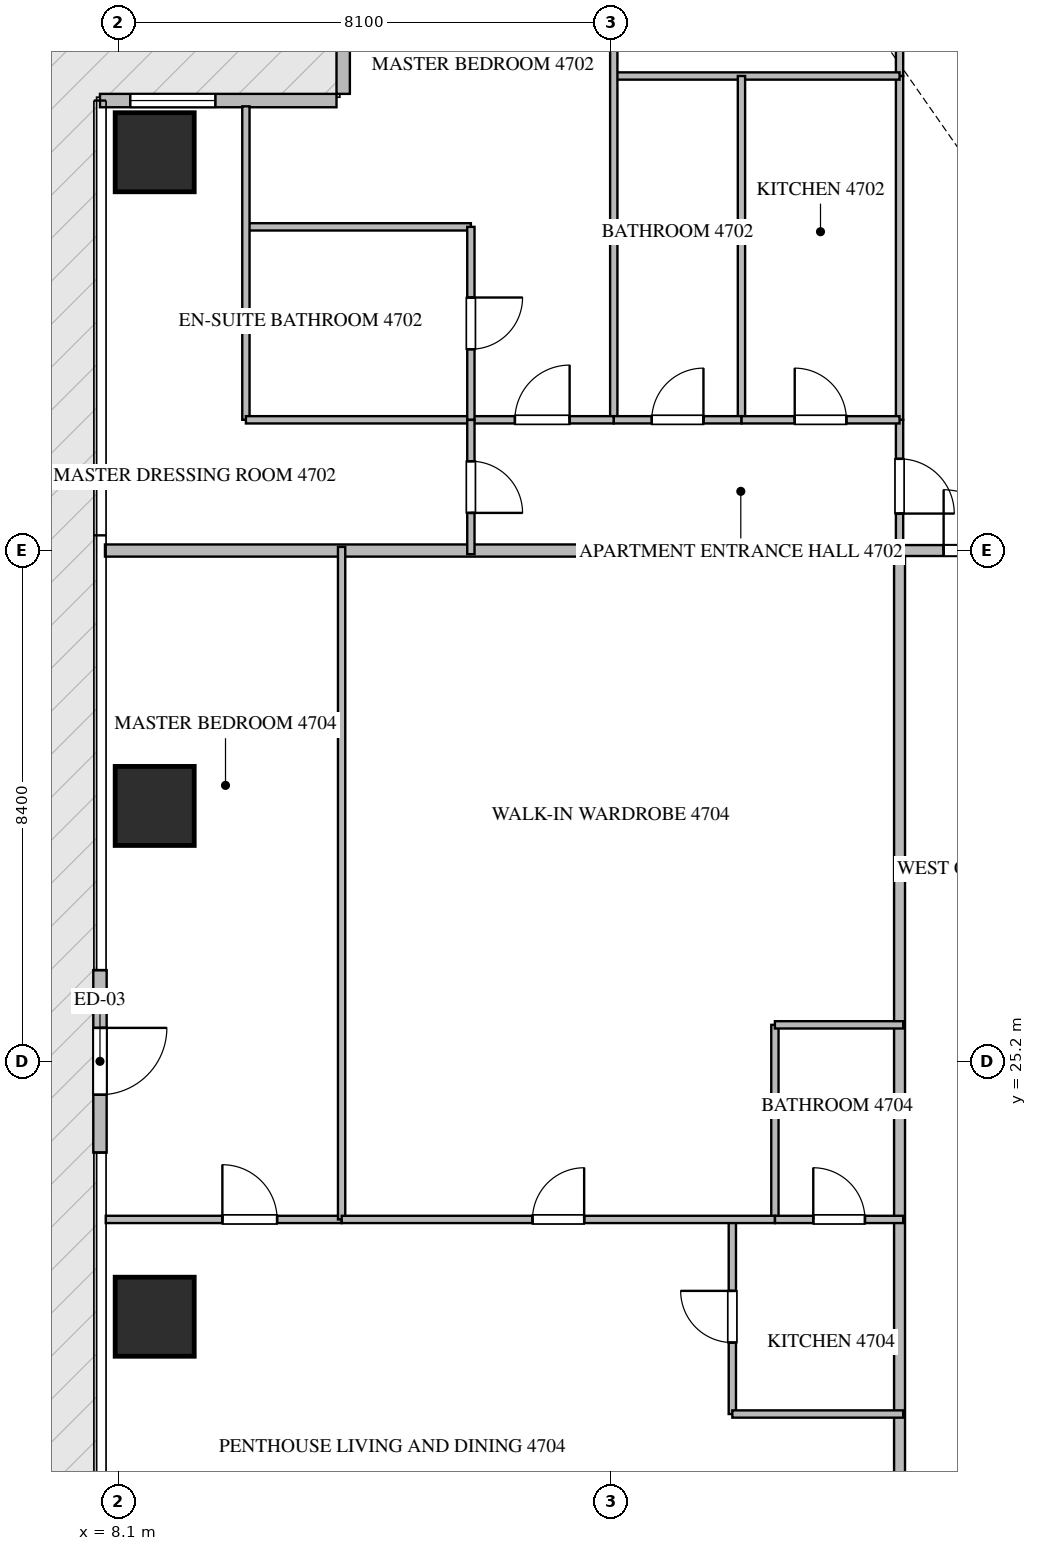
"""IFC4 building model, lengths in metres.
Left out: names, types, materials, properties, quantities, classifications, styles, units other than length and angle.
Written with IfcOpenShell. Run it as: python <this file> out.ifc"""

import sys

from ifc_helpers import new_model, si_unit, direction, frame, frame_2d, origin, origin_2d, place, context, subcontext, project, spatial, rectangle, extrude, source, transform, mapped, element, fill, save


model = new_model("IFC4")
c1 = context("Model", 3, precision=1e-05, world=origin(), true_north=direction((0.0, 1.0)))
c2 = subcontext(c1, "Body", "Model", "MODEL_VIEW")
j1 = project(units=[si_unit("LENGTHUNIT", "METRE"), si_unit("PLANEANGLEUNIT", "RADIAN")], contexts=[c1])
p1 = place(None, origin())
s1 = spatial("IfcSite", under=j1, at=p1, CompositionType="ELEMENT")
p2 = place(p1, origin())
s2 = spatial("IfcBuilding", under=s1, at=p2, CompositionType="ELEMENT")
p3 = place(p2, frame((0.0, 0.0, 187.65)))
s3 = spatial("IfcBuildingStorey", under=s2, at=p3, CompositionType="ELEMENT", Elevation=187.65)
m1 = source(origin(), c2, "Body", "SweptSolid", [
    extrude(rectangle(XDim=1.3, YDim=1.3, at=origin_2d()), origin(), (0.0, 0.0, 1.0), 3.75),
])
for number, where, z_axis, x_axis in (
    (1, (8.7, 21.0, -0.26), (0.0, 0.0, 1.0), (1.0, 0.0, 0.0)),
    (2, (8.7, 29.4, -0.26), (0.0, 0.0, 1.0), (1.0, 0.0, 0.0)),
    (3, (8.7, 40.15, -0.26), (0.0, 0.0, 1.0), (1.0, 0.0, 0.0)),
):
    element("IfcColumn", number, at=place(p3, frame(where, z_axis=z_axis, x_axis=x_axis)), inside=s3, PredefinedType="COLUMN", context=c2, shape_type="MappedRepresentation", body=[
        mapped(m1, transform((0.0, 0.0, 0.0), scale=1.0)),
    ])
p4 = place(p3, frame((11.8, 44.89, 0.0), z_axis=(0.0, 0.0, 1.0), x_axis=(0.0, -1.0, 0.0)))
e4 = element("IfcWall", 4, at=p4, inside=s3, PredefinedType="ELEMENTEDWALL", context=c2, shape_type="SweptSolid", body=[
    extrude(rectangle(XDim=3.78, YDim=0.22, at=frame_2d((1.89, 0.0))), origin(), (0.0, 0.0, 1.0), 3.475),
])
p5 = place(p4, frame((1.19, 0.0, 0.65)))
e5 = element("IfcOpeningElement", 5, at=p5, cuts=e4, PredefinedType="OPENING", context=c2, shape_type="SweptSolid", body=[
    extrude(rectangle(XDim=1.4, YDim=2.05, at=frame_2d((0.7, 1.025))), frame((0.0, 0.12, 0.0), z_axis=(0.0, -1.0, 0.0), x_axis=(1.0, 0.0, 0.0)), (0.0, 0.0, 1.0), 0.24),
])
p6 = place(p3, frame((11.69, 41.0, 0.0), z_axis=(0.0, 0.0, 1.0), x_axis=(-1.0, 0.0, 0.0)))
e6 = element("IfcWall", 6, at=p6, inside=s3, PredefinedType="ELEMENTEDWALL", context=c2, shape_type="SweptSolid", body=[
    extrude(rectangle(XDim=3.89, YDim=0.22, at=frame_2d((1.945, 0.0))), origin(), (0.0, 0.0, 1.0), 3.475),
])
p7 = place(p6, frame((1.992, 0.0, 0.65)))
e7 = element("IfcOpeningElement", 7, at=p7, cuts=e6, PredefinedType="OPENING", context=c2, shape_type="SweptSolid", body=[
    extrude(rectangle(XDim=1.4, YDim=2.05, at=frame_2d((0.7, 1.025))), frame((0.0, 0.12, 0.0), z_axis=(0.0, -1.0, 0.0), x_axis=(1.0, 0.0, 0.0)), (0.0, 0.0, 1.0), 0.24),
])
p8 = place(p3, frame((7.8, 26.7, 0.0), z_axis=(0.0, 0.0, 1.0), x_axis=(0.0, -1.0, 0.0)))
e8 = element("IfcWall", 8, at=p8, inside=s3, PredefinedType="ELEMENTEDWALL", context=c2, shape_type="SweptSolid", body=[
    extrude(rectangle(XDim=3.0, YDim=0.22, at=frame_2d((1.5, 0.0))), origin(), (0.0, 0.0, 1.0), 3.475),
])
p9 = place(p8, frame((0.95, 0.0, 0.0)))
e9 = element("IfcOpeningElement", 9, at=p9, cuts=e8, PredefinedType="OPENING", context=c2, shape_type="SweptSolid", body=[
    extrude(rectangle(XDim=1.1, YDim=2.2, at=frame_2d((0.55, 1.1))), frame((0.0, 0.12, 0.0), z_axis=(0.0, -1.0, 0.0), x_axis=(1.0, 0.0, 0.0)), (0.0, 0.0, 1.0), 0.24),
])
p10 = place(p3, frame((7.882, 33.6, 0.0), z_axis=(0.0, 0.0, 1.0), x_axis=(1.0, 0.0, 0.0)))
e10 = element("IfcWall", 10, at=p10, inside=s3, PredefinedType="PARTITIONING", context=c2, shape_type="SweptSolid", body=[
    extrude(rectangle(XDim=13.068, YDim=0.2, at=frame_2d((6.534, 0.0))), origin(), (0.0, 0.0, 1.0), 3.49),
])
p11 = place(p3, frame((20.95, 14.9, 0.0), z_axis=(0.0, 0.0, 1.0), x_axis=(0.0, 1.0, 0.0)))
e11 = element("IfcWall", 11, at=p11, inside=s3, PredefinedType="PARTITIONING", context=c2, shape_type="SweptSolid", body=[
    extrude(rectangle(XDim=18.7, YDim=0.18, at=frame_2d((9.35, 0.0))), origin(), (0.0, 0.0, 1.0), 3.49),
])
p12 = place(p11, frame((1.805, 0.0, 0.0)))
e12 = element("IfcOpeningElement", 12, at=p12, cuts=e11, PredefinedType="OPENING", context=c2, shape_type="SweptSolid", body=[
    extrude(rectangle(XDim=1.0, YDim=2.15, at=frame_2d((0.5, 1.075))), frame((0.0, 0.1, 0.0), z_axis=(0.0, -1.0, 0.0), x_axis=(1.0, 0.0, 0.0)), (0.0, 0.0, 1.0), 0.2),
])
p13 = place(p3, frame((20.952, 33.6, 0.0), z_axis=(0.0, 0.0, 1.0), x_axis=(1.0, 0.0, 0.0)))
e13 = element("IfcWall", 13, at=p13, inside=s3, PredefinedType="PARTITIONING", context=c2, shape_type="SweptSolid", body=[
    extrude(rectangle(XDim=2.446, YDim=0.18, at=frame_2d((1.223, 0.0))), origin(), (0.0, 0.0, 1.0), 3.49),
])
p14 = place(p13, frame((0.723, 0.0, 0.0)))
e14 = element("IfcOpeningElement", 14, at=p14, cuts=e13, PredefinedType="OPENING", context=c2, shape_type="SweptSolid", body=[
    extrude(rectangle(XDim=1.0, YDim=2.15, at=frame_2d((0.5, 1.075))), frame((0.0, 0.1, 0.0), z_axis=(0.0, -1.0, 0.0), x_axis=(1.0, 0.0, 0.0)), (0.0, 0.0, 1.0), 0.2),
])
p15 = place(p3, frame((20.95, 35.75, 0.0), z_axis=(0.0, 0.0, 1.0), x_axis=(0.0, -1.0, 0.0)))
e15 = element("IfcWall", 15, at=p15, inside=s3, PredefinedType="PARTITIONING", context=c2, shape_type="SweptSolid", body=[
    extrude(rectangle(XDim=2.148, YDim=0.12, at=frame_2d((1.074, 0.0))), origin(), (0.0, 0.0, 1.0), 3.49),
])
p16 = place(p15, frame((0.642, 0.0, 0.0)))
e16 = element("IfcOpeningElement", 16, at=p16, cuts=e15, PredefinedType="OPENING", context=c2, shape_type="SweptSolid", body=[
    extrude(rectangle(XDim=0.9, YDim=2.1, at=frame_2d((0.45, 1.05))), frame((0.0, 0.07, 0.0), z_axis=(0.0, -1.0, 0.0), x_axis=(1.0, 0.0, 0.0)), (0.0, 0.0, 1.0), 0.14),
])
p17 = place(p3, frame((20.95, 48.905, 0.0), z_axis=(0.0, 0.0, 1.0), x_axis=(0.0, -1.0, 0.0)))
e17 = element("IfcWall", 17, at=p17, inside=s3, PredefinedType="PARTITIONING", context=c2, shape_type="SweptSolid", body=[
    extrude(rectangle(XDim=7.501, YDim=0.12, at=frame_2d((3.75, 0.0))), origin(), (0.0, 0.0, 1.0), 3.49),
])
p18 = place(p17, frame((3.631, 0.0, 0.0)))
e18 = element("IfcOpeningElement", 18, at=p18, cuts=e17, PredefinedType="OPENING", context=c2, shape_type="SweptSolid", body=[
    extrude(rectangle(XDim=0.9, YDim=2.1, at=frame_2d((0.45, 1.05))), frame((0.0, 0.07, 0.0), z_axis=(0.0, -1.0, 0.0), x_axis=(1.0, 0.0, 0.0)), (0.0, 0.0, 1.0), 0.14),
])
p19 = place(p3, frame((20.95, 41.402, 0.0), z_axis=(0.0, 0.0, 1.0), x_axis=(0.0, -1.0, 0.0)))
e19 = element("IfcWall", 19, at=p19, inside=s3, PredefinedType="PARTITIONING", context=c2, shape_type="SweptSolid", body=[
    extrude(rectangle(XDim=5.65, YDim=0.12, at=frame_2d((2.825, 0.0))), origin(), (0.0, 0.0, 1.0), 3.49),
])
p20 = place(p3, frame((16.25, 41.404, 0.0), z_axis=(0.0, 0.0, 1.0), x_axis=(1.0, 0.0, 0.0)))
e20 = element("IfcWall", 20, at=p20, inside=s3, PredefinedType="PARTITIONING", context=c2, shape_type="SweptSolid", body=[
    extrude(rectangle(XDim=4.7, YDim=0.12, at=frame_2d((2.35, 0.0))), origin(), (0.0, 0.0, 1.0), 3.49),
])
p21 = place(p3, frame((16.25, 48.905, 0.0), z_axis=(0.0, 0.0, 1.0), x_axis=(0.0, -1.0, 0.0)))
e21 = element("IfcWall", 21, at=p21, inside=s3, PredefinedType="PARTITIONING", context=c2, shape_type="SweptSolid", body=[
    extrude(rectangle(XDim=13.155, YDim=0.12, at=frame_2d((6.578, 0.0))), origin(), (0.0, 0.0, 1.0), 3.49),
])
p22 = place(p3, frame((18.35, 41.404, 0.0), z_axis=(0.0, 0.0, 1.0), x_axis=(0.0, -1.0, 0.0)))
e22 = element("IfcWall", 22, at=p22, inside=s3, PredefinedType="PARTITIONING", context=c2, shape_type="SweptSolid", body=[
    extrude(rectangle(XDim=5.654, YDim=0.12, at=frame_2d((2.827, 0.0))), origin(), (0.0, 0.0, 1.0), 3.49),
])
p23 = place(p3, frame((16.25, 35.75, 0.0), z_axis=(0.0, 0.0, 1.0), x_axis=(1.0, 0.0, 0.0)))
e23 = element("IfcWall", 23, at=p23, inside=s3, PredefinedType="PARTITIONING", context=c2, shape_type="SweptSolid", body=[
    extrude(rectangle(XDim=2.1, YDim=0.12, at=frame_2d((1.05, 0.0))), origin(), (0.0, 0.0, 1.0), 3.49),
])
p24 = place(p23, frame((0.625, 0.0, 0.0)))
e24 = element("IfcOpeningElement", 24, at=p24, cuts=e23, PredefinedType="OPENING", context=c2, shape_type="SweptSolid", body=[
    extrude(rectangle(XDim=0.85, YDim=2.1, at=frame_2d((0.425, 1.05))), frame((0.0, 0.07, 0.0), z_axis=(0.0, -1.0, 0.0), x_axis=(1.0, 0.0, 0.0)), (0.0, 0.0, 1.0), 0.14),
])
p25 = place(p3, frame((18.352, 35.75, 0.0), z_axis=(0.0, 0.0, 1.0), x_axis=(1.0, 0.0, 0.0)))
e25 = element("IfcWall", 25, at=p25, inside=s3, PredefinedType="PARTITIONING", context=c2, shape_type="SweptSolid", body=[
    extrude(rectangle(XDim=2.598, YDim=0.12, at=frame_2d((1.299, 0.0))), origin(), (0.0, 0.0, 1.0), 3.49),
])
p26 = place(p25, frame((0.874, 0.0, 0.0)))
e26 = element("IfcOpeningElement", 26, at=p26, cuts=e25, PredefinedType="OPENING", context=c2, shape_type="SweptSolid", body=[
    extrude(rectangle(XDim=0.85, YDim=2.1, at=frame_2d((0.425, 1.05))), frame((0.0, 0.07, 0.0), z_axis=(0.0, -1.0, 0.0), x_axis=(1.0, 0.0, 0.0)), (0.0, 0.0, 1.0), 0.14),
])
p27 = place(p3, frame((13.9, 35.75, 0.0), z_axis=(0.0, 0.0, 1.0), x_axis=(1.0, 0.0, 0.0)))
e27 = element("IfcWall", 27, at=p27, inside=s3, PredefinedType="PARTITIONING", context=c2, shape_type="SweptSolid", body=[
    extrude(rectangle(XDim=2.348, YDim=0.12, at=frame_2d((1.174, 0.0))), origin(), (0.0, 0.0, 1.0), 3.49),
])
p28 = place(p27, frame((0.724, 0.0, 0.0)))
e28 = element("IfcOpeningElement", 28, at=p28, cuts=e27, PredefinedType="OPENING", context=c2, shape_type="SweptSolid", body=[
    extrude(rectangle(XDim=0.9, YDim=2.1, at=frame_2d((0.45, 1.05))), frame((0.0, 0.07, 0.0), z_axis=(0.0, -1.0, 0.0), x_axis=(1.0, 0.0, 0.0)), (0.0, 0.0, 1.0), 0.14),
])
p29 = place(p3, frame((10.2, 38.923, 0.0), z_axis=(0.0, 0.0, 1.0), x_axis=(1.0, 0.0, 0.0)))
e29 = element("IfcWall", 29, at=p29, inside=s3, PredefinedType="PARTITIONING", context=c2, shape_type="SweptSolid", body=[
    extrude(rectangle(XDim=3.7, YDim=0.12, at=frame_2d((1.85, 0.0))), origin(), (0.0, 0.0, 1.0), 3.49),
])
p30 = place(p3, frame((10.2, 40.905, 0.0), z_axis=(0.0, 0.0, 1.0), x_axis=(0.0, -1.0, 0.0)))
e30 = element("IfcWall", 30, at=p30, inside=s3, PredefinedType="PARTITIONING", context=c2, shape_type="SweptSolid", body=[
    extrude(rectangle(XDim=5.155, YDim=0.12, at=frame_2d((2.578, 0.0))), origin(), (0.0, 0.0, 1.0), 3.49),
])
p31 = place(p3, frame((10.2, 35.75, 0.0), z_axis=(0.0, 0.0, 1.0), x_axis=(1.0, 0.0, 0.0)))
e31 = element("IfcWall", 31, at=p31, inside=s3, PredefinedType="PARTITIONING", context=c2, shape_type="SweptSolid", body=[
    extrude(rectangle(XDim=3.698, YDim=0.12, at=frame_2d((1.849, 0.0))), origin(), (0.0, 0.0, 1.0), 3.49),
])
p32 = place(p3, frame((13.9, 38.923, 0.0), z_axis=(0.0, 0.0, 1.0), x_axis=(0.0, -1.0, 0.0)))
e32 = element("IfcWall", 32, at=p32, inside=s3, PredefinedType="PARTITIONING", context=c2, shape_type="SweptSolid", body=[
    extrude(rectangle(XDim=3.173, YDim=0.12, at=frame_2d((1.586, 0.0))), origin(), (0.0, 0.0, 1.0), 3.49),
])
p33 = place(p32, frame((1.162, 0.0, 0.0)))
e33 = element("IfcOpeningElement", 33, at=p33, cuts=e32, PredefinedType="OPENING", context=c2, shape_type="SweptSolid", body=[
    extrude(rectangle(XDim=0.85, YDim=2.1, at=frame_2d((0.425, 1.05))), frame((0.0, 0.07, 0.0), z_axis=(0.0, -1.0, 0.0), x_axis=(1.0, 0.0, 0.0)), (0.0, 0.0, 1.0), 0.14),
])
p34 = place(p3, frame((13.9, 35.748, 0.0), z_axis=(0.0, 0.0, 1.0), x_axis=(0.0, -1.0, 0.0)))
e34 = element("IfcWall", 34, at=p34, inside=s3, PredefinedType="PARTITIONING", context=c2, shape_type="SweptSolid", body=[
    extrude(rectangle(XDim=2.208, YDim=0.12, at=frame_2d((1.104, 0.0))), origin(), (0.0, 0.0, 1.0), 3.49),
])
p35 = place(p34, frame((0.679, 0.0, 0.0)))
e35 = element("IfcOpeningElement", 35, at=p35, cuts=e34, PredefinedType="OPENING", context=c2, shape_type="SweptSolid", body=[
    extrude(rectangle(XDim=0.85, YDim=2.1, at=frame_2d((0.425, 1.05))), frame((0.0, 0.07, 0.0), z_axis=(0.0, -1.0, 0.0), x_axis=(1.0, 0.0, 0.0)), (0.0, 0.0, 1.0), 0.14),
])
p36 = place(p3, frame((18.2, 19.4, 0.0), z_axis=(0.0, 0.0, 1.0), x_axis=(0.0, 1.0, 0.0)))
e36 = element("IfcWall", 36, at=p36, inside=s3, PredefinedType="PARTITIONING", context=c2, shape_type="SweptSolid", body=[
    extrude(rectangle(XDim=3.2, YDim=0.12, at=frame_2d((1.6, 0.0))), origin(), (0.0, 0.0, 1.0), 3.49),
])
p37 = place(p36, frame((1.175, 0.0, 0.0)))
e37 = element("IfcOpeningElement", 37, at=p37, cuts=e36, PredefinedType="OPENING", context=c2, shape_type="SweptSolid", body=[
    extrude(rectangle(XDim=0.85, YDim=2.1, at=frame_2d((0.425, 1.05))), frame((0.0, 0.07, 0.0), z_axis=(0.0, -1.0, 0.0), x_axis=(1.0, 0.0, 0.0)), (0.0, 0.0, 1.0), 0.14),
])
p38 = place(p3, frame((18.2, 19.4, 0.0), z_axis=(0.0, 0.0, 1.0), x_axis=(1.0, 0.0, 0.0)))
e38 = element("IfcWall", 38, at=p38, inside=s3, PredefinedType="PARTITIONING", context=c2, shape_type="SweptSolid", body=[
    extrude(rectangle(XDim=2.81, YDim=0.12, at=frame_2d((1.405, 0.0))), origin(), (0.0, 0.0, 1.0), 3.49),
])
p39 = place(p3, frame((7.895, 22.6, 0.0), z_axis=(0.0, 0.0, 1.0), x_axis=(1.0, 0.0, 0.0)))
e39 = element("IfcWall", 39, at=p39, inside=s3, PredefinedType="PARTITIONING", context=c2, shape_type="SweptSolid", body=[
    extrude(rectangle(XDim=3.879, YDim=0.12, at=frame_2d((1.939, 0.0))), origin(), (0.0, 0.0, 1.0), 3.49),
])
p40 = place(p39, frame((1.918, 0.0, 0.0)))
e40 = element("IfcOpeningElement", 40, at=p40, cuts=e39, PredefinedType="OPENING", context=c2, shape_type="SweptSolid", body=[
    extrude(rectangle(XDim=0.9, YDim=2.1, at=frame_2d((0.45, 1.05))), frame((0.0, 0.07, 0.0), z_axis=(0.0, -1.0, 0.0), x_axis=(1.0, 0.0, 0.0)), (0.0, 0.0, 1.0), 0.14),
])
p41 = place(p3, frame((11.774, 22.6, 0.0), z_axis=(0.0, 0.0, 1.0), x_axis=(0.0, 1.0, 0.0)))
e41 = element("IfcWall", 41, at=p41, inside=s3, PredefinedType="PARTITIONING", context=c2, shape_type="SweptSolid", body=[
    extrude(rectangle(XDim=11.06, YDim=0.12, at=frame_2d((5.53, 0.0))), origin(), (0.0, 0.0, 1.0), 3.49),
])
p42 = place(p3, frame((18.9, 22.6, 0.0), z_axis=(0.0, 0.0, 1.0), x_axis=(0.0, 1.0, 0.0)))
e42 = element("IfcWall", 42, at=p42, inside=s3, PredefinedType="PARTITIONING", context=c2, shape_type="SweptSolid", body=[
    extrude(rectangle(XDim=3.2, YDim=0.12, at=frame_2d((1.6, 0.0))), origin(), (0.0, 0.0, 1.0), 3.49),
])
p43 = place(p3, frame((18.9, 25.8, 0.0), z_axis=(0.0, 0.0, 1.0), x_axis=(1.0, 0.0, 0.0)))
e43 = element("IfcWall", 43, at=p43, inside=s3, PredefinedType="PARTITIONING", context=c2, shape_type="SweptSolid", body=[
    extrude(rectangle(XDim=2.11, YDim=0.12, at=frame_2d((1.055, 0.0))), origin(), (0.0, 0.0, 1.0), 3.49),
])
p44 = place(p3, frame((11.776, 22.6, 0.0), z_axis=(0.0, 0.0, 1.0), x_axis=(1.0, 0.0, 0.0)))
e44 = element("IfcWall", 44, at=p44, inside=s3, PredefinedType="PARTITIONING", context=c2, shape_type="SweptSolid", body=[
    extrude(rectangle(XDim=7.124, YDim=0.12, at=frame_2d((3.562, 0.0))), origin(), (0.0, 0.0, 1.0), 3.49),
])
p45 = place(p44, frame((3.137, 0.0, 0.0)))
e45 = element("IfcOpeningElement", 45, at=p45, cuts=e44, PredefinedType="OPENING", context=c2, shape_type="SweptSolid", body=[
    extrude(rectangle(XDim=0.85, YDim=2.1, at=frame_2d((0.425, 1.05))), frame((0.0, 0.07, 0.0), z_axis=(0.0, -1.0, 0.0), x_axis=(1.0, 0.0, 0.0)), (0.0, 0.0, 1.0), 0.14),
])
p46 = place(p3, frame((18.902, 22.6, 0.0), z_axis=(0.0, 0.0, 1.0), x_axis=(1.0, 0.0, 0.0)))
e46 = element("IfcWall", 46, at=p46, inside=s3, PredefinedType="PARTITIONING", context=c2, shape_type="SweptSolid", body=[
    extrude(rectangle(XDim=2.108, YDim=0.12, at=frame_2d((1.054, 0.0))), origin(), (0.0, 0.0, 1.0), 3.49),
])
p47 = place(p46, frame((0.629, 0.0, 0.0)))
e47 = element("IfcOpeningElement", 47, at=p47, cuts=e46, PredefinedType="OPENING", context=c2, shape_type="SweptSolid", body=[
    extrude(rectangle(XDim=0.85, YDim=2.1, at=frame_2d((0.425, 1.05))), frame((0.0, 0.07, 0.0), z_axis=(0.0, -1.0, 0.0), x_axis=(1.0, 0.0, 0.0)), (0.0, 0.0, 1.0), 0.14),
])
m2 = source(origin(), c2, "Body", "SweptSolid", [
    extrude(rectangle(XDim=1.4, YDim=2.05, at=frame_2d((0.7, 1.025))), frame((0.0, 0.03, 0.0), z_axis=(0.0, -1.0, 0.0), x_axis=(1.0, 0.0, 0.0)), (0.0, 0.0, 1.0), 0.06),
])
p48 = place(p7, origin())
e48 = element("IfcWindow", 48, at=p48, inside=s3, PartitioningType="SINGLE_PANEL", PredefinedType="WINDOW", context=c2, shape_type="MappedRepresentation", body=[
    mapped(m2, transform((0.0, 0.0, 0.0), scale=1.0)),
])
fill(e7, e48)
m3 = source(origin(), c2, "Body", "SweptSolid", [
    extrude(rectangle(XDim=1.1, YDim=2.2, at=frame_2d((0.55, 1.1))), frame((0.0, 0.025, 0.0), z_axis=(0.0, -1.0, 0.0), x_axis=(1.0, 0.0, 0.0)), (0.0, 0.0, 1.0), 0.05),
])
p49 = place(p9, origin())
e49 = element("IfcDoor", 49, at=p49, inside=s3, OperationType="SINGLE_SWING_LEFT", PredefinedType="DOOR", context=c2, shape_type="MappedRepresentation", body=[
    mapped(m3, transform((0.0, 0.0, 0.0), scale=1.0)),
])
fill(e9, e49)
m4 = source(origin(), c2, "Body", "SweptSolid", [
    extrude(rectangle(XDim=1.0, YDim=2.15, at=frame_2d((0.5, 1.075))), frame((0.0, 0.025, 0.0), z_axis=(0.0, -1.0, 0.0), x_axis=(1.0, 0.0, 0.0)), (0.0, 0.0, 1.0), 0.05),
])
p50 = place(p14, origin())
e50 = element("IfcDoor", 50, at=p50, inside=s3, OperationType="SINGLE_SWING_LEFT", PredefinedType="DOOR", context=c2, shape_type="MappedRepresentation", body=[
    mapped(m4, transform((0.0, 0.0, 0.0), scale=1.0)),
])
fill(e14, e50)
m5 = source(origin(), c2, "Body", "SweptSolid", [
    extrude(rectangle(XDim=0.9, YDim=2.1, at=frame_2d((0.45, 1.05))), frame((0.0, 0.025, 0.0), z_axis=(0.0, -1.0, 0.0), x_axis=(1.0, 0.0, 0.0)), (0.0, 0.0, 1.0), 0.05),
])
p51 = place(p16, origin())
e51 = element("IfcDoor", 51, at=p51, inside=s3, OperationType="SINGLE_SWING_RIGHT", PredefinedType="DOOR", context=c2, shape_type="MappedRepresentation", body=[
    mapped(m5, transform((0.0, 0.0, 0.0), scale=1.0)),
])
fill(e16, e51)
m6 = source(origin(), c2, "Body", "SweptSolid", [
    extrude(rectangle(XDim=0.85, YDim=2.1, at=frame_2d((0.425, 1.05))), frame((0.0, 0.025, 0.0), z_axis=(0.0, -1.0, 0.0), x_axis=(1.0, 0.0, 0.0)), (0.0, 0.0, 1.0), 0.05),
])
p52 = place(p24, origin())
e52 = element("IfcDoor", 52, at=p52, inside=s3, OperationType="SINGLE_SWING_RIGHT", PredefinedType="DOOR", context=c2, shape_type="MappedRepresentation", body=[
    mapped(m6, transform((0.0, 0.0, 0.0), scale=1.0)),
])
fill(e24, e52)
p53 = place(p26, origin())
e53 = element("IfcDoor", 53, at=p53, inside=s3, OperationType="SINGLE_SWING_LEFT", PredefinedType="DOOR", context=c2, shape_type="MappedRepresentation", body=[
    mapped(m6, transform((0.0, 0.0, 0.0), scale=1.0)),
])
fill(e26, e53)
p54 = place(p28, origin())
e54 = element("IfcDoor", 54, at=p54, inside=s3, OperationType="SINGLE_SWING_RIGHT", PredefinedType="DOOR", context=c2, shape_type="MappedRepresentation", body=[
    mapped(m5, transform((0.0, 0.0, 0.0), scale=1.0)),
])
fill(e28, e54)
p55 = place(p33, origin())
e55 = element("IfcDoor", 55, at=p55, inside=s3, OperationType="SINGLE_SWING_LEFT", PredefinedType="DOOR", context=c2, shape_type="MappedRepresentation", body=[
    mapped(m6, transform((0.0, 0.0, 0.0), scale=1.0)),
])
fill(e33, e55)
p56 = place(p35, origin())
e56 = element("IfcDoor", 56, at=p56, inside=s3, OperationType="SINGLE_SWING_RIGHT", PredefinedType="DOOR", context=c2, shape_type="MappedRepresentation", body=[
    mapped(m6, transform((0.0, 0.0, 0.0), scale=1.0)),
])
fill(e35, e56)
p57 = place(p37, origin())
e57 = element("IfcDoor", 57, at=p57, inside=s3, OperationType="SINGLE_SWING_RIGHT", PredefinedType="DOOR", context=c2, shape_type="MappedRepresentation", body=[
    mapped(m6, transform((0.0, 0.0, 0.0), scale=1.0)),
])
fill(e37, e57)
p58 = place(p40, origin())
e58 = element("IfcDoor", 58, at=p58, inside=s3, OperationType="SINGLE_SWING_LEFT", PredefinedType="DOOR", context=c2, shape_type="MappedRepresentation", body=[
    mapped(m5, transform((0.0, 0.0, 0.0), scale=1.0)),
])
fill(e40, e58)
p59 = place(p45, origin())
e59 = element("IfcDoor", 59, at=p59, inside=s3, OperationType="SINGLE_SWING_RIGHT", PredefinedType="DOOR", context=c2, shape_type="MappedRepresentation", body=[
    mapped(m6, transform((0.0, 0.0, 0.0), scale=1.0)),
])
fill(e45, e59)
p60 = place(p47, origin())
e60 = element("IfcDoor", 60, at=p60, inside=s3, OperationType="SINGLE_SWING_LEFT", PredefinedType="DOOR", context=c2, shape_type="MappedRepresentation", body=[
    mapped(m6, transform((0.0, 0.0, 0.0), scale=1.0)),
])
fill(e47, e60)
save(model, sys.argv[1])
